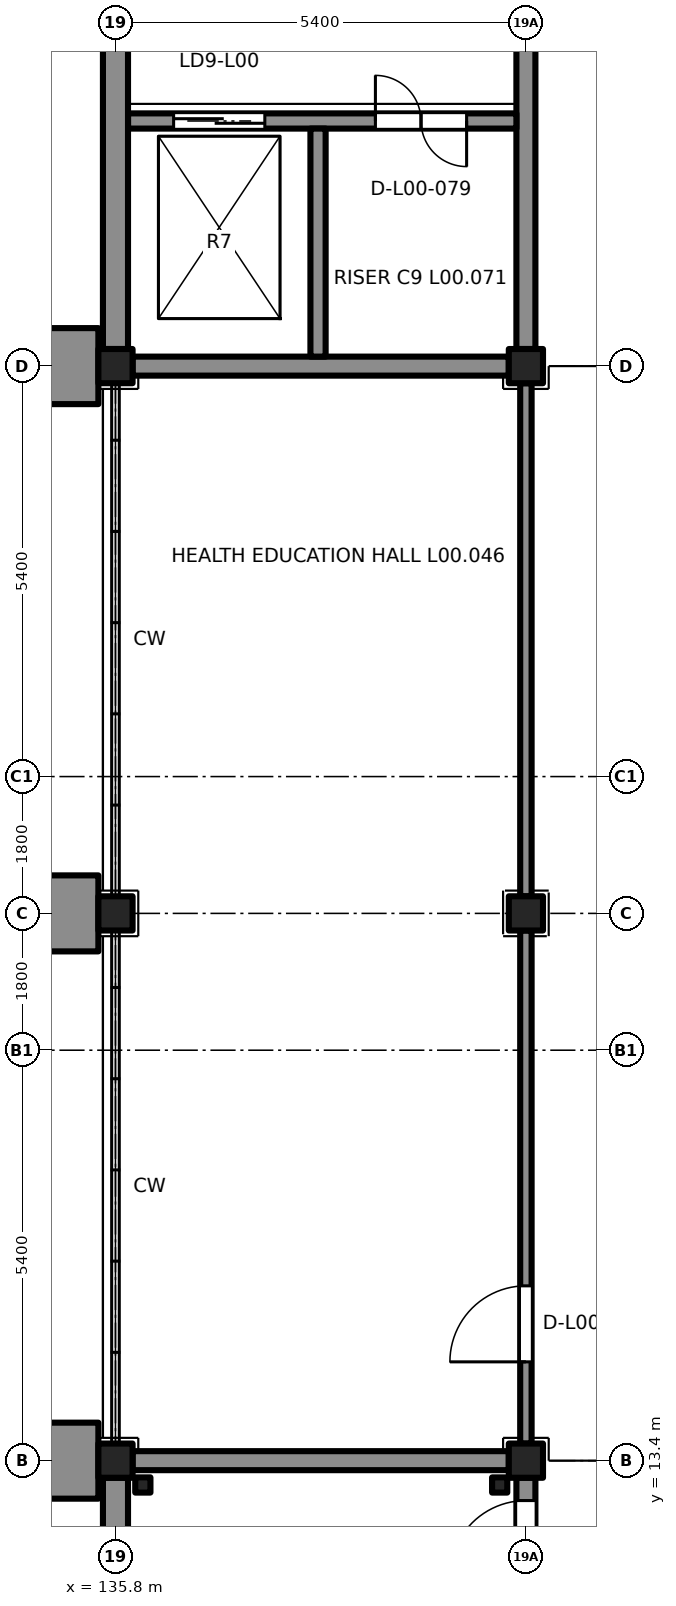
"""IFC4 building model, lengths in metres.
Left out: names, types, materials, properties, quantities, classifications, styles, units other than length and angle.
Written with IfcOpenShell. Run it as: python <this file> out.ifc"""

import sys

from ifc_helpers import new_model, si_unit, direction, frame, frame_2d, origin, origin_2d, place, context, subcontext, project, spatial, rectangle, extrude, element, fill, save


model = new_model("IFC4")
c1 = context("Model", 3, precision=1e-05, world=origin(), true_north=direction((0.0, 1.0)))
c2 = subcontext(c1, "Body", "Model", "MODEL_VIEW")
j1 = project(units=[si_unit("LENGTHUNIT", "METRE"), si_unit("PLANEANGLEUNIT", "RADIAN")], contexts=[c1])
p1 = place(None, origin())
s1 = spatial("IfcSite", under=j1, at=p1, CompositionType="ELEMENT")
p2 = place(p1, origin())
s2 = spatial("IfcBuilding", under=s1, at=p2, CompositionType="ELEMENT")
p3 = place(p2, origin())
s3 = spatial("IfcBuildingStorey", under=s2, at=p3, CompositionType="ELEMENT", Elevation=0.0)
for number, where, z_axis, x_axis in (
    (1, (135.8, 13.4, -0.2), (0.0, 0.0, 1.0), (1.0, 0.0, 0.0)),
    (2, (135.8, 20.6, -0.2), (0.0, 0.0, 1.0), (1.0, 0.0, 0.0)),
    (3, (135.8, 27.8, -0.2), (0.0, 0.0, 1.0), (1.0, 0.0, 0.0)),
    (4, (141.2, 13.4, -0.2), (0.0, 0.0, 1.0), (1.0, 0.0, 0.0)),
    (5, (141.2, 20.6, -0.2), (0.0, 0.0, 1.0), (1.0, 0.0, 0.0)),
    (6, (141.2, 27.8, -0.2), (0.0, 0.0, 1.0), (1.0, 0.0, 0.0)),
):
    element("IfcColumn", number, at=place(p3, frame(where, z_axis=z_axis, x_axis=x_axis)), inside=s3, PredefinedType="COLUMN", context=c2, shape_type="SweptSolid", body=[
        extrude(rectangle(XDim=0.45, YDim=0.45, at=origin_2d()), origin(), (0.0, 0.0, 1.0), 5.55),
    ])
p4 = place(p3, frame((141.2, 6.365, 0.0), z_axis=(0.0, 0.0, 1.0), x_axis=(0.0, 1.0, 0.0)))
e7 = element("IfcWall", 7, at=p4, inside=s3, PredefinedType="SHEAR", context=c2, shape_type="SweptSolid", body=[
    extrude(rectangle(XDim=6.81, YDim=0.25, at=frame_2d((3.405, 0.0))), origin(), (0.0, 0.0, 1.0), 6.05),
])
p5 = place(p4, frame((5.51, 0.0, 0.0)))
e8 = element("IfcOpeningElement", 8, at=p5, cuts=e7, PredefinedType="OPENING", context=c2, shape_type="SweptSolid", body=[
    extrude(rectangle(XDim=1.0, YDim=2.1, at=frame_2d((0.5, 1.05))), frame((0.0, 0.135, 0.0), z_axis=(0.0, -1.0, 0.0), x_axis=(1.0, 0.0, 0.0)), (0.0, 0.0, 1.0), 0.27),
])
p6 = place(p3, frame((136.025, 13.4, 0.0), z_axis=(0.0, 0.0, 1.0), x_axis=(1.0, 0.0, 0.0)))
e9 = element("IfcWall", 9, at=p6, inside=s3, PredefinedType="SHEAR", context=c2, shape_type="SweptSolid", body=[
    extrude(rectangle(XDim=4.95, YDim=0.25, at=frame_2d((2.475, 0.0))), origin(), (0.0, 0.0, 1.0), 6.05),
])
for number, where, z_axis, x_axis in (
    (10, (136.16, 13.08, 0.0), (0.0, 0.0, 1.0), (1.0, 0.0, 0.0)),
    (11, (140.855, 13.08, 0.0), (0.0, 0.0, 1.0), (1.0, 0.0, 0.0)),
):
    element("IfcColumn", number, at=place(p3, frame(where, z_axis=z_axis, x_axis=x_axis)), inside=s3, PredefinedType="COLUMN", context=c2, shape_type="SweptSolid", body=[
        extrude(rectangle(XDim=0.2, YDim=0.2, at=origin_2d()), origin(), (0.0, 0.0, 1.0), 2.95),
    ])
p7 = place(p3, frame((141.2, 28.025, -1.4), z_axis=(0.0, 0.0, 1.0), x_axis=(0.0, 1.0, 0.0)))
e12 = element("IfcWall", 12, at=p7, inside=s3, PredefinedType="SHEAR", context=c2, shape_type="SweptSolid", body=[
    extrude(rectangle(XDim=6.75, YDim=0.25, at=frame_2d((3.375, 0.0))), origin(), (0.0, 0.0, 1.0), 7.45),
])
p8 = place(p7, frame((4.075, 0.0, 1.4)))
e13 = element("IfcOpeningElement", 13, at=p8, cuts=e12, PredefinedType="OPENING", context=c2, shape_type="SweptSolid", body=[
    extrude(rectangle(XDim=1.8, YDim=2.1, at=frame_2d((0.9, 1.05))), frame((0.0, 0.135, 0.0), z_axis=(0.0, -1.0, 0.0), x_axis=(1.0, 0.0, 0.0)), (0.0, 0.0, 1.0), 0.27),
])
p9 = place(p3, frame((136.025, 27.8, -1.4), z_axis=(0.0, 0.0, 1.0), x_axis=(1.0, 0.0, 0.0)))
e14 = element("IfcWall", 14, at=p9, inside=s3, PredefinedType="SHEAR", context=c2, shape_type="SweptSolid", body=[
    extrude(rectangle(XDim=4.95, YDim=0.25, at=frame_2d((2.475, 0.0))), origin(), (0.0, 0.0, 1.0), 7.45),
])
p10 = place(p3, frame((135.965, 31.025, -1.4), z_axis=(0.0, 0.0, 1.0), x_axis=(1.0, 0.0, 0.0)))
e15 = element("IfcWall", 15, at=p10, inside=s3, PredefinedType="SHEAR", context=c2, shape_type="SweptSolid", body=[
    extrude(rectangle(XDim=5.11, YDim=0.2, at=frame_2d((2.555, 0.0))), origin(), (0.0, 0.0, 1.0), 7.45),
])
p11 = place(p10, frame((0.6, 0.0, 1.4)))
e16 = element("IfcOpeningElement", 16, at=p11, cuts=e15, PredefinedType="OPENING", context=c2, shape_type="SweptSolid", body=[
    extrude(rectangle(XDim=1.2, YDim=2.1, at=frame_2d((0.6, 1.05))), frame((0.0, 0.11, 0.0), z_axis=(0.0, -1.0, 0.0), x_axis=(1.0, 0.0, 0.0)), (0.0, 0.0, 1.0), 0.22),
])
p12 = place(p10, frame((3.255, 0.0, 1.4)))
e17 = element("IfcOpeningElement", 17, at=p12, cuts=e15, PredefinedType="OPENING", context=c2, shape_type="SweptSolid", body=[
    extrude(rectangle(XDim=1.2, YDim=2.1, at=frame_2d((0.6, 1.05))), frame((0.0, 0.11, 0.0), z_axis=(0.0, -1.0, 0.0), x_axis=(1.0, 0.0, 0.0)), (0.0, 0.0, 1.0), 0.22),
])
p13 = place(p3, frame((138.465, 27.925, -1.4), z_axis=(0.0, 0.0, 1.0), x_axis=(0.0, 1.0, 0.0)))
e18 = element("IfcWall", 18, at=p13, inside=s3, PredefinedType="SHEAR", context=c2, shape_type="SweptSolid", body=[
    extrude(rectangle(XDim=3.0, YDim=0.2, at=frame_2d((1.5, 0.0))), origin(), (0.0, 0.0, 1.0), 7.45),
])
p14 = place(p3, frame((135.8, 27.925, -1.4), z_axis=(0.0, 0.0, 1.0), x_axis=(0.0, 1.0, 0.0)))
e19 = element("IfcWall", 19, at=p14, inside=s3, PredefinedType="SHEAR", context=c2, shape_type="SweptSolid", body=[
    extrude(rectangle(XDim=3.2, YDim=0.25, at=frame_2d((1.6, 0.0))), origin(), (0.0, 0.0, 1.0), 1.4),
])
p15 = place(p3, frame((135.8, 10.5, 0.0), z_axis=(0.0, 0.0, 1.0), x_axis=(0.0, 1.0, 0.0)))
e20 = element("IfcWall", 20, at=p15, inside=s3, PredefinedType="SOLIDWALL", context=c2, shape_type="SweptSolid", body=[
    extrude(rectangle(XDim=2.675, YDim=0.33, at=frame_2d((1.337, 0.0))), origin(), (0.0, 0.0, 1.0), 5.35),
])
p16 = place(p3, frame((135.8, 28.025, 0.0), z_axis=(0.0, 0.0, 1.0), x_axis=(0.0, 1.0, 0.0)))
e21 = element("IfcWall", 21, at=p16, inside=s3, PredefinedType="SOLIDWALL", context=c2, shape_type="SweptSolid", body=[
    extrude(rectangle(XDim=6.75, YDim=0.33, at=frame_2d((3.375, 0.0))), origin(), (0.0, 0.0, 1.0), 5.35),
])
for number, where, z_axis, x_axis in (
    (22, (135.2, 12.9, 0.0), (0.0, 0.0, 1.0), (0.0, 1.0, 0.0)),
    (23, (135.2, 20.1, 0.0), (0.0, 0.0, 1.0), (0.0, 1.0, 0.0)),
    (24, (135.2, 27.3, 0.0), (0.0, 0.0, 1.0), (0.0, 1.0, 0.0)),
):
    element("IfcWall", number, at=place(p3, frame(where, z_axis=z_axis, x_axis=x_axis)), inside=s3, PredefinedType="SOLIDWALL", context=c2, shape_type="SweptSolid", body=[
        extrude(rectangle(XDim=1.0, YDim=0.75, at=frame_2d((0.5, 0.0))), origin(), (0.0, 0.0, 1.0), 6.3),
    ])
p17 = place(p3, frame((141.2, 13.625, 0.0), z_axis=(0.0, 0.0, 1.0), x_axis=(0.0, 1.0, 0.0)))
e25 = element("IfcWall", 25, at=p17, inside=s3, PredefinedType="PARTITIONING", context=c2, shape_type="SweptSolid", body=[
    extrude(rectangle(XDim=6.75, YDim=0.15, at=frame_2d((3.375, 0.0))), origin(), (0.0, 0.0, 1.0), 5.35),
])
p18 = place(p17, frame((1.075, 0.0, 0.0)))
e26 = element("IfcOpeningElement", 26, at=p18, cuts=e25, PredefinedType="OPENING", context=c2, shape_type="SweptSolid", body=[
    extrude(rectangle(XDim=1.0, YDim=2.1, at=frame_2d((0.5, 1.05))), frame((0.0, 0.085, 0.0), z_axis=(0.0, -1.0, 0.0), x_axis=(1.0, 0.0, 0.0)), (0.0, 0.0, 1.0), 0.17),
])
p19 = place(p3, frame((141.2, 20.825, 0.0), z_axis=(0.0, 0.0, 1.0), x_axis=(0.0, 1.0, 0.0)))
e27 = element("IfcWall", 27, at=p19, inside=s3, PredefinedType="PARTITIONING", context=c2, shape_type="SweptSolid", body=[
    extrude(rectangle(XDim=6.75, YDim=0.15, at=frame_2d((3.375, 0.0))), origin(), (0.0, 0.0, 1.0), 5.35),
])
p20 = place(p5, origin())
e28 = element("IfcDoor", 28, at=p20, inside=s3, OperationType="SINGLE_SWING_RIGHT", PredefinedType="DOOR", context=c2, shape_type="SweptSolid", body=[
    extrude(rectangle(XDim=1.0, YDim=2.1, at=frame_2d((0.5, 1.05))), frame((0.0, 0.025, 0.0), z_axis=(0.0, -1.0, 0.0), x_axis=(1.0, 0.0, 0.0)), (0.0, 0.0, 1.0), 0.05),
])
fill(e8, e28)
p21 = place(p11, origin())
e29 = element("IfcDoor", 29, at=p21, inside=s3, OperationType="DOUBLE_DOOR_SLIDING", PredefinedType="DOOR", context=c2, shape_type="SweptSolid", body=[
    extrude(rectangle(XDim=1.2, YDim=2.1, at=frame_2d((0.6, 1.05))), frame((0.0, 0.025, 0.0), z_axis=(0.0, -1.0, 0.0), x_axis=(1.0, 0.0, 0.0)), (0.0, 0.0, 1.0), 0.05),
])
fill(e16, e29)
p22 = place(p12, origin())
e30 = element("IfcDoor", 30, at=p22, inside=s3, OperationType="DOUBLE_DOOR_SINGLE_SWING", PredefinedType="DOOR", context=c2, shape_type="SweptSolid", body=[
    extrude(rectangle(XDim=1.2, YDim=2.1, at=frame_2d((0.6, 1.05))), frame((0.0, 0.025, 0.0), z_axis=(0.0, -1.0, 0.0), x_axis=(1.0, 0.0, 0.0)), (0.0, 0.0, 1.0), 0.05),
])
fill(e17, e30)
p23 = place(p18, origin())
e31 = element("IfcDoor", 31, at=p23, inside=s3, OperationType="SINGLE_SWING_LEFT", PredefinedType="DOOR", context=c2, shape_type="SweptSolid", body=[
    extrude(rectangle(XDim=1.0, YDim=2.1, at=frame_2d((0.5, 1.05))), frame((0.0, 0.025, 0.0), z_axis=(0.0, -1.0, 0.0), x_axis=(1.0, 0.0, 0.0)), (0.0, 0.0, 1.0), 0.05),
])
fill(e26, e31)
save(model, sys.argv[1])
